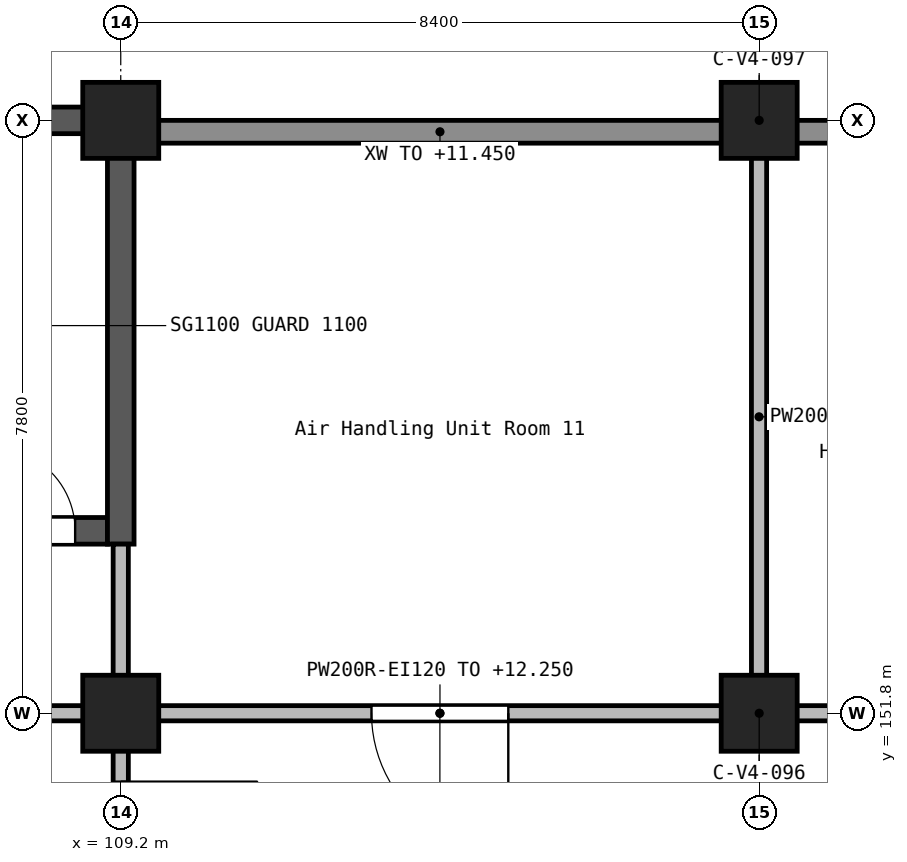
"""IFC4 building model, lengths in metres.
Left out: names, types, materials, properties, quantities, classifications, styles, units other than length and angle.
Written with IfcOpenShell. Run it as: python <this file> out.ifc"""

import sys

from ifc_helpers import new_model, si_unit, direction, frame, frame_2d, origin, origin_2d, place, context, subcontext, project, spatial, rectangle, extrude, element, fill, save


model = new_model("IFC4")
c1 = context("Model", 3, precision=1e-05, world=origin(), true_north=direction((0.0, 1.0)))
c2 = subcontext(c1, "Body", "Model", "MODEL_VIEW")
j1 = project(units=[si_unit("LENGTHUNIT", "METRE"), si_unit("PLANEANGLEUNIT", "RADIAN")], contexts=[c1])
p1 = place(None, origin())
s1 = spatial("IfcSite", under=j1, at=p1, CompositionType="ELEMENT")
p2 = place(p1, origin())
s2 = spatial("IfcBuilding", under=s1, at=p2, CompositionType="ELEMENT")
p3 = place(p2, frame((0.0, 0.0, 9.9)))
s3 = spatial("IfcBuildingStorey", under=s2, at=p3, CompositionType="ELEMENT", Elevation=9.9)
for number, where, z_axis, x_axis in (
    (1, (109.2, 151.8, 0.0), (0.0, 0.0, 1.0), (1.0, 0.0, 0.0)),
    (2, (109.2, 159.6, 0.0), (0.0, 0.0, 1.0), (1.0, 0.0, 0.0)),
    (3, (117.6, 151.8, 0.0), (0.0, 0.0, 1.0), (1.0, 0.0, 0.0)),
    (4, (117.6, 159.6, 0.0), (0.0, 0.0, 1.0), (1.0, 0.0, 0.0)),
):
    element("IfcColumn", number, at=place(p3, frame(where, z_axis=z_axis, x_axis=x_axis)), inside=s3, PredefinedType="COLUMN", context=c2, shape_type="SweptSolid", body=[
        extrude(rectangle(XDim=1.0, YDim=1.0, at=origin_2d()), origin(), (0.0, 0.0, 1.0), 2.7),
    ])
p4 = place(p3, frame((100.625, 159.6, 0.0), z_axis=(0.0, 0.0, 1.0), x_axis=(1.0, 0.0, 0.0)))
e5 = element("IfcWall", 5, at=p4, inside=s3, PredefinedType="SHEAR", context=c2, shape_type="SweptSolid", body=[
    extrude(rectangle(XDim=8.4, YDim=0.35, at=frame_2d((4.2, 0.0))), origin(), (0.0, 0.0, 1.0), 2.7),
])
p5 = place(p3, frame((100.975, 154.2, 0.0), z_axis=(0.0, 0.0, 1.0), x_axis=(1.0, 0.0, 0.0)))
e6 = element("IfcWall", 6, at=p5, inside=s3, PredefinedType="SHEAR", context=c2, shape_type="SweptSolid", body=[
    extrude(rectangle(XDim=8.05, YDim=0.35, at=frame_2d((4.025, 0.0))), origin(), (0.0, 0.0, 1.0), 2.7),
])
p6 = place(p5, frame((6.525, 0.0, 0.0)))
e7 = element("IfcOpeningElement", 7, at=p6, cuts=e6, PredefinedType="OPENING", context=c2, shape_type="SweptSolid", body=[
    extrude(rectangle(XDim=1.1, YDim=2.1, at=frame_2d((0.55, 1.05))), frame((0.0, 0.185, 0.0), z_axis=(0.0, -1.0, 0.0), x_axis=(1.0, 0.0, 0.0)), (0.0, 0.0, 1.0), 0.37),
])
p7 = place(p3, frame((109.2, 154.025, 0.0), z_axis=(0.0, 0.0, 1.0), x_axis=(0.0, 1.0, 0.0)))
e8 = element("IfcWall", 8, at=p7, inside=s3, PredefinedType="SHEAR", context=c2, shape_type="SweptSolid", body=[
    extrude(rectangle(XDim=5.75, YDim=0.35, at=frame_2d((2.875, 0.0))), origin(), (0.0, 0.0, 1.0), 2.7),
])
for number, where, z_axis, x_axis in (
    (9, (125.55, 159.45, 0.0), (0.0, 0.0, 1.0), (-1.0, 0.0, 0.0)),
    (10, (117.15, 159.45, 0.0), (0.0, 0.0, 1.0), (-1.0, 0.0, 0.0)),
):
    element("IfcWall", number, at=place(p3, frame(where, z_axis=z_axis, x_axis=x_axis)), inside=s3, PredefinedType="STANDARD", context=c2, shape_type="SweptSolid", body=[
        extrude(rectangle(XDim=7.5, YDim=0.3, at=frame_2d((3.75, 0.0))), origin(), (0.0, 0.0, 1.0), 1.55),
    ])
p8 = place(p3, frame((125.55, 151.8, 0.0), z_axis=(0.0, 0.0, 1.0), x_axis=(-1.0, 0.0, 0.0)))
e11 = element("IfcWall", 11, at=p8, inside=s3, PredefinedType="SOLIDWALL", context=c2, shape_type="SweptSolid", body=[
    extrude(rectangle(XDim=7.5, YDim=0.2, at=frame_2d((3.75, 0.0))), origin(), (0.0, 0.0, 1.0), 2.35),
])
p9 = place(p8, frame((5.052, 0.0, 0.0)))
e12 = element("IfcOpeningElement", 12, at=p9, cuts=e11, PredefinedType="OPENING", context=c2, shape_type="SweptSolid", body=[
    extrude(rectangle(XDim=1.0, YDim=2.1, at=frame_2d((0.5, 1.05))), frame((0.0, 0.11, 0.0), z_axis=(0.0, -1.0, 0.0), x_axis=(1.0, 0.0, 0.0)), (0.0, 0.0, 1.0), 0.22),
])
p10 = place(p8, frame((0.851, 0.0, 0.0)))
e13 = element("IfcOpeningElement", 13, at=p10, cuts=e11, PredefinedType="OPENING", context=c2, shape_type="SweptSolid", body=[
    extrude(rectangle(XDim=1.0, YDim=2.1, at=frame_2d((0.5, 1.05))), frame((0.0, 0.11, 0.0), z_axis=(0.0, -1.0, 0.0), x_axis=(1.0, 0.0, 0.0)), (0.0, 0.0, 1.0), 0.22),
])
p11 = place(p3, frame((117.15, 151.8, 0.0), z_axis=(0.0, 0.0, 1.0), x_axis=(-1.0, 0.0, 0.0)))
e14 = element("IfcWall", 14, at=p11, inside=s3, PredefinedType="SOLIDWALL", context=c2, shape_type="SweptSolid", body=[
    extrude(rectangle(XDim=7.5, YDim=0.2, at=frame_2d((3.75, 0.0))), origin(), (0.0, 0.0, 1.0), 2.35),
])
p12 = place(p11, frame((2.851, 0.0, 0.0)))
e15 = element("IfcOpeningElement", 15, at=p12, cuts=e14, PredefinedType="OPENING", context=c2, shape_type="SweptSolid", body=[
    extrude(rectangle(XDim=1.8, YDim=2.1, at=frame_2d((0.9, 1.05))), frame((0.0, 0.11, 0.0), z_axis=(0.0, -1.0, 0.0), x_axis=(1.0, 0.0, 0.0)), (0.0, 0.0, 1.0), 0.22),
])
p13 = place(p3, frame((108.75, 151.8, 0.0), z_axis=(0.0, 0.0, 1.0), x_axis=(-1.0, 0.0, 0.0)))
e16 = element("IfcWall", 16, at=p13, inside=s3, PredefinedType="SOLIDWALL", context=c2, shape_type="SweptSolid", body=[
    extrude(rectangle(XDim=7.5, YDim=0.2, at=frame_2d((3.75, 0.0))), origin(), (0.0, 0.0, 1.0), 2.35),
])
p14 = place(p13, frame((3.2, 0.0, 0.0)))
e17 = element("IfcOpeningElement", 17, at=p14, cuts=e16, PredefinedType="OPENING", context=c2, shape_type="SweptSolid", body=[
    extrude(rectangle(XDim=1.1, YDim=2.1, at=frame_2d((0.55, 1.05))), frame((0.0, 0.11, 0.0), z_axis=(0.0, -1.0, 0.0), x_axis=(1.0, 0.0, 0.0)), (0.0, 0.0, 1.0), 0.22),
])
p15 = place(p3, frame((109.2, 154.025, 0.0), z_axis=(0.0, 0.0, 1.0), x_axis=(0.0, -1.0, 0.0)))
e18 = element("IfcWall", 18, at=p15, inside=s3, PredefinedType="SOLIDWALL", context=c2, shape_type="SweptSolid", body=[
    extrude(rectangle(XDim=1.775, YDim=0.2, at=frame_2d((0.887, 0.0))), origin(), (0.0, 0.0, 1.0), 2.35),
])
p16 = place(p3, frame((109.2, 151.35, 0.0), z_axis=(0.0, 0.0, 1.0), x_axis=(0.0, -1.0, 0.0)))
e19 = element("IfcWall", 19, at=p16, inside=s3, PredefinedType="SOLIDWALL", context=c2, shape_type="SweptSolid", body=[
    extrude(rectangle(XDim=2.7, YDim=0.2, at=frame_2d((1.35, 0.0))), origin(), (0.0, 0.0, 1.0), 2.35),
])
p17 = place(p16, frame((0.45, 0.0, 0.0)))
e20 = element("IfcOpeningElement", 20, at=p17, cuts=e19, PredefinedType="OPENING", context=c2, shape_type="SweptSolid", body=[
    extrude(rectangle(XDim=1.8, YDim=2.1, at=frame_2d((0.9, 1.05))), frame((0.0, 0.11, 0.0), z_axis=(0.0, -1.0, 0.0), x_axis=(1.0, 0.0, 0.0)), (0.0, 0.0, 1.0), 0.22),
])
p18 = place(p3, frame((117.598, 152.25, 0.0), z_axis=(0.0, 0.0, 1.0), x_axis=(0.0, 1.0, 0.0)))
e21 = element("IfcWall", 21, at=p18, inside=s3, PredefinedType="SOLIDWALL", context=c2, shape_type="SweptSolid", body=[
    extrude(rectangle(XDim=6.9, YDim=0.2, at=frame_2d((3.45, 0.0))), origin(), (0.0, 0.0, 1.0), 2.35),
])
p19 = place(p17, frame((1.8, 0.0, 0.0), z_axis=(0.0, 0.0, 1.0), x_axis=(-1.0, 0.0, 0.0)))
e22 = element("IfcDoor", 22, at=p19, inside=s3, OperationType="DOUBLE_DOOR_SINGLE_SWING", PredefinedType="DOOR", context=c2, shape_type="SweptSolid", body=[
    extrude(rectangle(XDim=1.8, YDim=2.1, at=frame_2d((0.9, 1.05))), frame((0.0, 0.025, 0.0), z_axis=(0.0, -1.0, 0.0), x_axis=(1.0, 0.0, 0.0)), (0.0, 0.0, 1.0), 0.05),
])
fill(e20, e22)
p20 = place(p6, origin())
e23 = element("IfcDoor", 23, at=p20, inside=s3, OperationType="SINGLE_SWING_RIGHT", PredefinedType="DOOR", context=c2, shape_type="SweptSolid", body=[
    extrude(rectangle(XDim=1.1, YDim=2.1, at=frame_2d((0.55, 1.05))), frame((0.0, 0.025, 0.0), z_axis=(0.0, -1.0, 0.0), x_axis=(1.0, 0.0, 0.0)), (0.0, 0.0, 1.0), 0.05),
])
fill(e7, e23)
p21 = place(p12, frame((1.8, 0.0, 0.0), z_axis=(0.0, 0.0, 1.0), x_axis=(-1.0, 0.0, 0.0)))
e24 = element("IfcDoor", 24, at=p21, inside=s3, OperationType="DOUBLE_DOOR_SINGLE_SWING", PredefinedType="DOOR", context=c2, shape_type="SweptSolid", body=[
    extrude(rectangle(XDim=1.8, YDim=2.1, at=frame_2d((0.9, 1.05))), frame((0.0, 0.025, 0.0), z_axis=(0.0, -1.0, 0.0), x_axis=(1.0, 0.0, 0.0)), (0.0, 0.0, 1.0), 0.05),
])
fill(e15, e24)
save(model, sys.argv[1])
